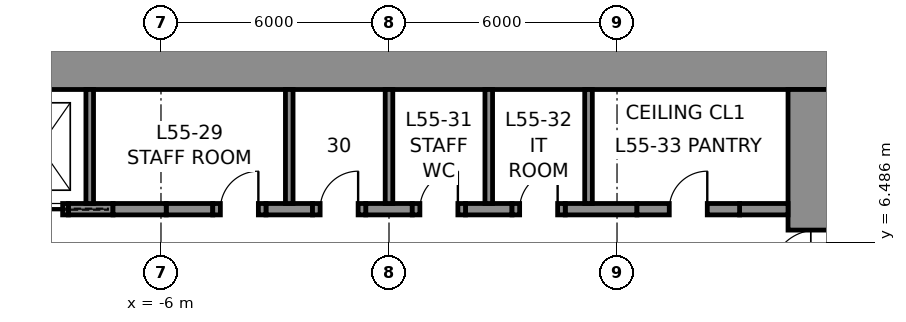
"""IFC4 building model, lengths in metres.
Left out: names, types, materials, properties, quantities, classifications, styles, units other than length and angle.
Written with IfcOpenShell. Run it as: python <this file> out.ifc"""

import sys

from ifc_helpers import new_model, si_unit, direction, frame, frame_2d, origin, place, context, subcontext, project, spatial, rectangle, extrude, element, fill, save


model = new_model("IFC4")
c1 = context("Model", 3, precision=1e-05, world=origin(), true_north=direction((0.0, 1.0)))
c2 = subcontext(c1, "Body", "Model", "MODEL_VIEW")
j1 = project(units=[si_unit("LENGTHUNIT", "METRE"), si_unit("PLANEANGLEUNIT", "RADIAN")], contexts=[c1])
p1 = place(None, origin())
s1 = spatial("IfcSite", under=j1, at=p1, CompositionType="ELEMENT")
p2 = place(p1, origin())
s2 = spatial("IfcBuilding", under=s1, at=p2, CompositionType="ELEMENT")
p3 = place(p2, frame((0.0, 0.0, 249.8)))
s3 = spatial("IfcBuildingStorey", under=s2, at=p3, CompositionType="ELEMENT", Elevation=249.8)
p4 = place(p3, frame((-12.0, 11.25, 0.0), z_axis=(0.0, 0.0, 1.0), x_axis=(1.0, 0.0, 0.0)))
e1 = element("IfcWall", 1, at=p4, inside=s3, PredefinedType="SHEAR", context=c2, shape_type="SweptSolid", body=[
    extrude(rectangle(XDim=24.0, YDim=1.5, at=frame_2d((12.0, 0.0))), origin(), (0.0, 0.0, 1.0), 4.0),
])
p5 = place(p3, frame((11.25, 10.5, 0.0), z_axis=(0.0, 0.0, 1.0), x_axis=(0.0, -1.0, 0.0)))
e2 = element("IfcWall", 2, at=p5, inside=s3, PredefinedType="SHEAR", context=c2, shape_type="SweptSolid", body=[
    extrude(rectangle(XDim=21.0, YDim=1.5, at=frame_2d((10.5, 0.0))), origin(), (0.0, 0.0, 1.0), 4.0),
])
p6 = place(p5, frame((3.7, 0.0, 0.0)))
e3 = element("IfcOpeningElement", 3, at=p6, cuts=e2, PredefinedType="OPENING", context=c2, shape_type="SweptSolid", body=[
    extrude(rectangle(XDim=1.2, YDim=2.3, at=frame_2d((0.6, 1.15))), frame((0.0, 0.76, 0.0), z_axis=(0.0, -1.0, 0.0), x_axis=(1.0, 0.0, 0.0)), (0.0, 0.0, 1.0), 1.52),
])
p7 = place(p5, frame((16.1, 0.0, 0.0)))
e4 = element("IfcOpeningElement", 4, at=p7, cuts=e2, PredefinedType="OPENING", context=c2, shape_type="SweptSolid", body=[
    extrude(rectangle(XDim=1.2, YDim=2.3, at=frame_2d((0.6, 1.15))), frame((0.0, 0.76, 0.0), z_axis=(0.0, -1.0, 0.0), x_axis=(1.0, 0.0, 0.0)), (0.0, 0.0, 1.0), 1.52),
])
p8 = place(p3, frame((-8.438, 7.35, 0.0), z_axis=(0.0, 0.0, 1.0), x_axis=(1.0, 0.0, 0.0)))
e5 = element("IfcWall", 5, at=p8, inside=s3, PredefinedType="SHEAR", context=c2, shape_type="SweptSolid", body=[
    extrude(rectangle(XDim=1.175, YDim=0.3, at=frame_2d((0.587, 0.0))), origin(), (0.0, 0.0, 1.0), 4.0),
])
for number, where, z_axis, x_axis in (
    (6, (-5.863, 7.35, 0.0), (0.0, 0.0, 1.0), (1.0, 0.0, 0.0)),
    (7, (-3.238, 7.35, 0.0), (0.0, 0.0, 1.0), (1.0, 0.0, 0.0)),
    (8, (-0.613, 7.35, 0.0), (0.0, 0.0, 1.0), (1.0, 0.0, 0.0)),
    (9, (2.012, 7.35, 0.0), (0.0, 0.0, 1.0), (1.0, 0.0, 0.0)),
):
    element("IfcWall", number, at=place(p3, frame(where, z_axis=z_axis, x_axis=x_axis)), inside=s3, PredefinedType="SHEAR", context=c2, shape_type="SweptSolid", body=[
        extrude(rectangle(XDim=1.225, YDim=0.3, at=frame_2d((0.613, 0.0))), origin(), (0.0, 0.0, 1.0), 4.0),
    ])
p9 = place(p3, frame((4.637, 7.35, 0.0), z_axis=(0.0, 0.0, 1.0), x_axis=(1.0, 0.0, 0.0)))
e10 = element("IfcWall", 10, at=p9, inside=s3, PredefinedType="SHEAR", context=c2, shape_type="SweptSolid", body=[
    extrude(rectangle(XDim=1.887, YDim=0.3, at=frame_2d((0.944, 0.0))), origin(), (0.0, 0.0, 1.0), 4.0),
])
p10 = place(p3, frame((9.225, 7.35, 0.0), z_axis=(0.0, 0.0, 1.0), x_axis=(1.0, 0.0, 0.0)))
e11 = element("IfcWall", 11, at=p10, inside=s3, PredefinedType="SHEAR", context=c2, shape_type="SweptSolid", body=[
    extrude(rectangle(XDim=1.275, YDim=0.3, at=frame_2d((0.637, 0.0))), origin(), (0.0, 0.0, 1.0), 4.0),
])
p11 = place(p3, frame((-9.938, 7.35, 0.0), z_axis=(0.0, 0.0, 1.0), x_axis=(1.0, 0.0, 0.0)))
e12 = element("IfcWall", 12, at=p11, inside=s3, PredefinedType="PARTITIONING", context=c2, shape_type="SweptSolid", body=[
    extrude(rectangle(XDim=1.5, YDim=0.3, at=frame_2d((0.75, 0.0))), origin(), (0.0, 0.0, 1.0), 4.0),
])
p12 = place(p11, frame((0.15, 0.0, 0.0)))
e13 = element("IfcOpeningElement", 13, at=p12, cuts=e12, PredefinedType="OPENING", context=c2, shape_type="SweptSolid", body=[
    extrude(rectangle(XDim=1.2, YDim=2.3, at=frame_2d((0.6, 1.15))), frame((0.0, 0.16, 0.0), z_axis=(0.0, -1.0, 0.0), x_axis=(1.0, 0.0, 0.0)), (0.0, 0.0, 1.0), 0.32),
])
p13 = place(p3, frame((-7.262, 7.35, 0.0), z_axis=(0.0, 0.0, 1.0), x_axis=(1.0, 0.0, 0.0)))
e14 = element("IfcWall", 14, at=p13, inside=s3, PredefinedType="PARTITIONING", context=c2, shape_type="SweptSolid", body=[
    extrude(rectangle(XDim=1.4, YDim=0.3, at=frame_2d((0.7, 0.0))), origin(), (0.0, 0.0, 1.0), 4.0),
])
p14 = place(p3, frame((-4.637, 7.35, 0.0), z_axis=(0.0, 0.0, 1.0), x_axis=(1.0, 0.0, 0.0)))
e15 = element("IfcWall", 15, at=p14, inside=s3, PredefinedType="PARTITIONING", context=c2, shape_type="SweptSolid", body=[
    extrude(rectangle(XDim=1.4, YDim=0.3, at=frame_2d((0.7, 0.0))), origin(), (0.0, 0.0, 1.0), 4.0),
])
p15 = place(p14, frame((0.2, 0.0, 0.0)))
e16 = element("IfcOpeningElement", 16, at=p15, cuts=e15, PredefinedType="OPENING", context=c2, shape_type="SweptSolid", body=[
    extrude(rectangle(XDim=1.0, YDim=2.3, at=frame_2d((0.5, 1.15))), frame((0.0, 0.16, 0.0), z_axis=(0.0, -1.0, 0.0), x_axis=(1.0, 0.0, 0.0)), (0.0, 0.0, 1.0), 0.32),
])
p16 = place(p3, frame((-2.012, 7.35, 0.0), z_axis=(0.0, 0.0, 1.0), x_axis=(1.0, 0.0, 0.0)))
e17 = element("IfcWall", 17, at=p16, inside=s3, PredefinedType="PARTITIONING", context=c2, shape_type="SweptSolid", body=[
    extrude(rectangle(XDim=1.4, YDim=0.3, at=frame_2d((0.7, 0.0))), origin(), (0.0, 0.0, 1.0), 4.0),
])
p17 = place(p16, frame((0.2, 0.0, 0.0)))
e18 = element("IfcOpeningElement", 18, at=p17, cuts=e17, PredefinedType="OPENING", context=c2, shape_type="SweptSolid", body=[
    extrude(rectangle(XDim=1.0, YDim=2.3, at=frame_2d((0.5, 1.15))), frame((0.0, 0.16, 0.0), z_axis=(0.0, -1.0, 0.0), x_axis=(1.0, 0.0, 0.0)), (0.0, 0.0, 1.0), 0.32),
])
p18 = place(p3, frame((0.613, 7.35, 0.0), z_axis=(0.0, 0.0, 1.0), x_axis=(1.0, 0.0, 0.0)))
e19 = element("IfcWall", 19, at=p18, inside=s3, PredefinedType="PARTITIONING", context=c2, shape_type="SweptSolid", body=[
    extrude(rectangle(XDim=1.4, YDim=0.3, at=frame_2d((0.7, 0.0))), origin(), (0.0, 0.0, 1.0), 4.0),
])
p19 = place(p18, frame((0.2, 0.0, 0.0)))
e20 = element("IfcOpeningElement", 20, at=p19, cuts=e19, PredefinedType="OPENING", context=c2, shape_type="SweptSolid", body=[
    extrude(rectangle(XDim=1.0, YDim=2.3, at=frame_2d((0.5, 1.15))), frame((0.0, 0.16, 0.0), z_axis=(0.0, -1.0, 0.0), x_axis=(1.0, 0.0, 0.0)), (0.0, 0.0, 1.0), 0.32),
])
p20 = place(p3, frame((3.238, 7.35, 0.0), z_axis=(0.0, 0.0, 1.0), x_axis=(1.0, 0.0, 0.0)))
e21 = element("IfcWall", 21, at=p20, inside=s3, PredefinedType="PARTITIONING", context=c2, shape_type="SweptSolid", body=[
    extrude(rectangle(XDim=1.4, YDim=0.3, at=frame_2d((0.7, 0.0))), origin(), (0.0, 0.0, 1.0), 4.0),
])
p21 = place(p20, frame((0.2, 0.0, 0.0)))
e22 = element("IfcOpeningElement", 22, at=p21, cuts=e21, PredefinedType="OPENING", context=c2, shape_type="SweptSolid", body=[
    extrude(rectangle(XDim=1.0, YDim=2.3, at=frame_2d((0.5, 1.15))), frame((0.0, 0.16, 0.0), z_axis=(0.0, -1.0, 0.0), x_axis=(1.0, 0.0, 0.0)), (0.0, 0.0, 1.0), 0.32),
])
p22 = place(p3, frame((6.525, 7.35, 0.0), z_axis=(0.0, 0.0, 1.0), x_axis=(1.0, 0.0, 0.0)))
e23 = element("IfcWall", 23, at=p22, inside=s3, PredefinedType="PARTITIONING", context=c2, shape_type="SweptSolid", body=[
    extrude(rectangle(XDim=2.7, YDim=0.3, at=frame_2d((1.35, 0.0))), origin(), (0.0, 0.0, 1.0), 4.0),
])
p23 = place(p22, frame((0.85, 0.0, 0.0)))
e24 = element("IfcOpeningElement", 24, at=p23, cuts=e23, PredefinedType="OPENING", context=c2, shape_type="SweptSolid", body=[
    extrude(rectangle(XDim=1.0, YDim=2.3, at=frame_2d((0.5, 1.15))), frame((0.0, 0.16, 0.0), z_axis=(0.0, -1.0, 0.0), x_axis=(1.0, 0.0, 0.0)), (0.0, 0.0, 1.0), 0.32),
])
for number, where, z_axis, x_axis in (
    (25, (-7.875, 7.5, 0.0), (0.0, 0.0, 1.0), (0.0, 1.0, 0.0)),
    (26, (-2.625, 7.5, 0.0), (0.0, 0.0, 1.0), (0.0, 1.0, 0.0)),
    (27, (0.0, 7.5, 0.0), (0.0, 0.0, 1.0), (0.0, 1.0, 0.0)),
    (28, (2.625, 7.5, 0.0), (0.0, 0.0, 1.0), (0.0, 1.0, 0.0)),
    (29, (5.25, 7.5, 0.0), (0.0, 0.0, 1.0), (0.0, 1.0, 0.0)),
):
    element("IfcWall", number, at=place(p3, frame(where, z_axis=z_axis, x_axis=x_axis)), inside=s3, PredefinedType="PARTITIONING", context=c2, shape_type="SweptSolid", body=[
        extrude(rectangle(XDim=3.0, YDim=0.2, at=frame_2d((1.5, 0.0))), origin(), (0.0, 0.0, 1.0), 4.0),
    ])
p24 = place(p15, origin())
e30 = element("IfcDoor", 30, at=p24, inside=s3, OperationType="SINGLE_SWING_RIGHT", PredefinedType="DOOR", context=c2, shape_type="SweptSolid", body=[
    extrude(rectangle(XDim=1.0, YDim=2.3, at=frame_2d((0.5, 1.15))), frame((0.0, 0.025, 0.0), z_axis=(0.0, -1.0, 0.0), x_axis=(1.0, 0.0, 0.0)), (0.0, 0.0, 1.0), 0.05),
])
fill(e16, e30)
p25 = place(p17, origin())
e31 = element("IfcDoor", 31, at=p25, inside=s3, OperationType="SINGLE_SWING_RIGHT", PredefinedType="DOOR", context=c2, shape_type="SweptSolid", body=[
    extrude(rectangle(XDim=1.0, YDim=2.3, at=frame_2d((0.5, 1.15))), frame((0.0, 0.025, 0.0), z_axis=(0.0, -1.0, 0.0), x_axis=(1.0, 0.0, 0.0)), (0.0, 0.0, 1.0), 0.05),
])
fill(e18, e31)
p26 = place(p19, origin())
e32 = element("IfcDoor", 32, at=p26, inside=s3, OperationType="SINGLE_SWING_RIGHT", PredefinedType="DOOR", context=c2, shape_type="SweptSolid", body=[
    extrude(rectangle(XDim=1.0, YDim=2.3, at=frame_2d((0.5, 1.15))), frame((0.0, 0.025, 0.0), z_axis=(0.0, -1.0, 0.0), x_axis=(1.0, 0.0, 0.0)), (0.0, 0.0, 1.0), 0.05),
])
fill(e20, e32)
p27 = place(p21, origin())
e33 = element("IfcDoor", 33, at=p27, inside=s3, OperationType="SINGLE_SWING_RIGHT", PredefinedType="DOOR", context=c2, shape_type="SweptSolid", body=[
    extrude(rectangle(XDim=1.0, YDim=2.3, at=frame_2d((0.5, 1.15))), frame((0.0, 0.025, 0.0), z_axis=(0.0, -1.0, 0.0), x_axis=(1.0, 0.0, 0.0)), (0.0, 0.0, 1.0), 0.05),
])
fill(e22, e33)
p28 = place(p23, origin())
e34 = element("IfcDoor", 34, at=p28, inside=s3, OperationType="SINGLE_SWING_RIGHT", PredefinedType="DOOR", context=c2, shape_type="SweptSolid", body=[
    extrude(rectangle(XDim=1.0, YDim=2.3, at=frame_2d((0.5, 1.15))), frame((0.0, 0.025, 0.0), z_axis=(0.0, -1.0, 0.0), x_axis=(1.0, 0.0, 0.0)), (0.0, 0.0, 1.0), 0.05),
])
fill(e24, e34)
p29 = place(p6, frame((1.2, 0.0, 0.0), z_axis=(0.0, 0.0, 1.0), x_axis=(-1.0, 0.0, 0.0)))
e35 = element("IfcDoor", 35, at=p29, inside=s3, OperationType="SINGLE_SWING_LEFT", PredefinedType="DOOR", context=c2, shape_type="SweptSolid", body=[
    extrude(rectangle(XDim=1.2, YDim=2.3, at=frame_2d((0.6, 1.15))), frame((0.0, 0.025, 0.0), z_axis=(0.0, -1.0, 0.0), x_axis=(1.0, 0.0, 0.0)), (0.0, 0.0, 1.0), 0.05),
])
fill(e3, e35)
p30 = place(p12, frame((1.2, 0.0, 0.0), z_axis=(0.0, 0.0, 1.0), x_axis=(-1.0, 0.0, 0.0)))
e36 = element("IfcDoor", 36, at=p30, inside=s3, OperationType="SLIDING_TO_LEFT", PredefinedType="DOOR", context=c2, shape_type="SweptSolid", body=[
    extrude(rectangle(XDim=1.2, YDim=2.3, at=frame_2d((0.6, 1.15))), frame((0.0, 0.025, 0.0), z_axis=(0.0, -1.0, 0.0), x_axis=(1.0, 0.0, 0.0)), (0.0, 0.0, 1.0), 0.05),
])
fill(e13, e36)
save(model, sys.argv[1])
